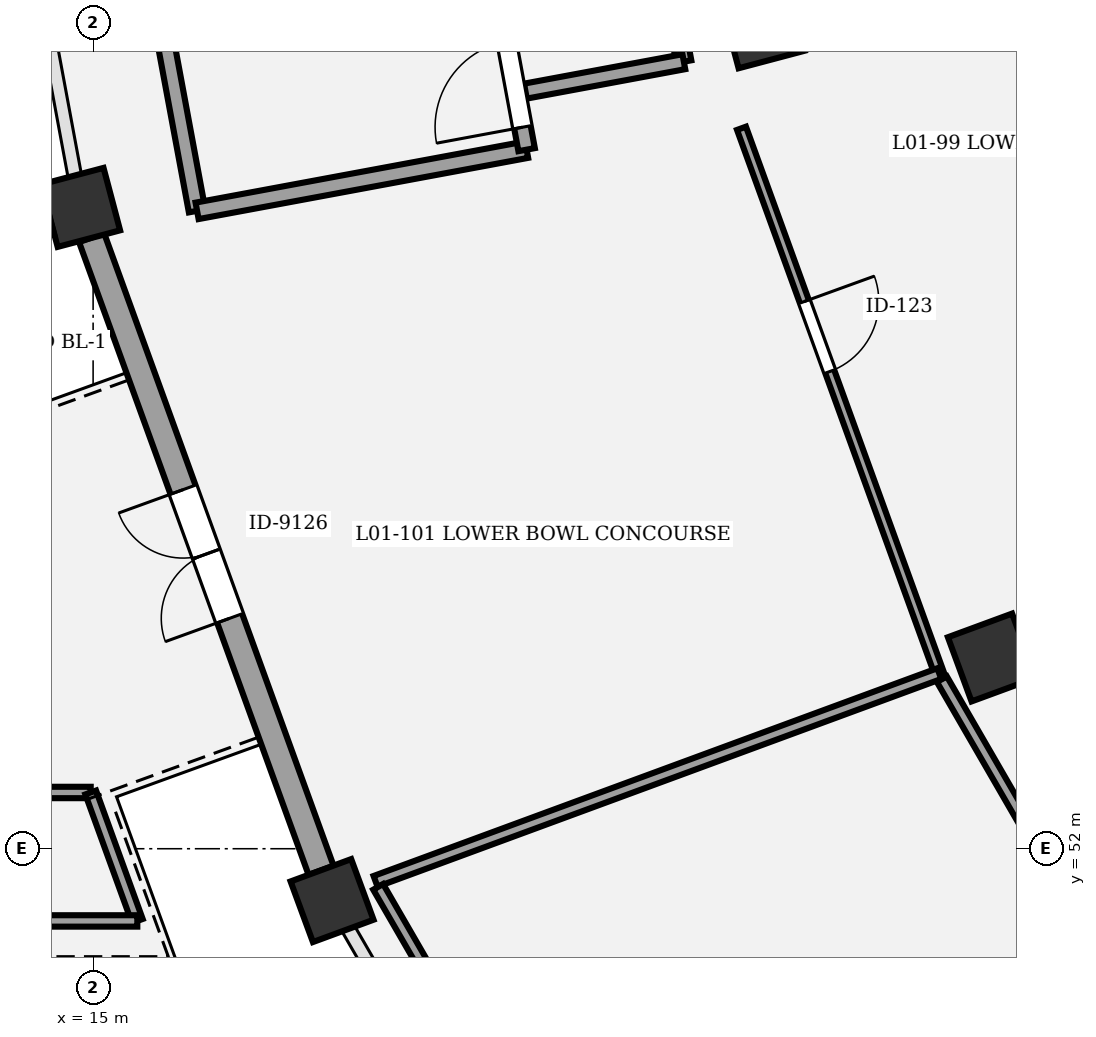
"""IFC4 building model, lengths in metres.
Left out: names, types, materials, properties, quantities, classifications, styles, units other than length and angle.
Written with IfcOpenShell. Run it as: python <this file> out.ifc"""

import sys

from ifc_helpers import new_model, si_unit, direction, frame, frame_2d, origin, origin_2d, place, context, subcontext, project, spatial, rectangle, extrude, element, fill, save


model = new_model("IFC4")
c1 = context("Model", 3, precision=1e-05, world=origin(), true_north=direction((0.0, 1.0)))
c2 = subcontext(c1, "Body", "Model", "MODEL_VIEW")
j1 = project(units=[si_unit("LENGTHUNIT", "METRE"), si_unit("PLANEANGLEUNIT", "RADIAN")], contexts=[c1])
p1 = place(None, origin())
s1 = spatial("IfcSite", under=j1, at=p1, CompositionType="ELEMENT")
p2 = place(p1, origin())
s2 = spatial("IfcBuilding", under=s1, at=p2, CompositionType="ELEMENT")
p3 = place(p2, frame((0.0, 0.0, 5.4)))
s3 = spatial("IfcBuildingStorey", under=s2, at=p3, CompositionType="ELEMENT", Elevation=5.4)
p4 = place(p3, frame((23.812, 62.818, 0.0), z_axis=(0.0, 0.0, 1.0), x_axis=(-0.966600102017, -0.256289373133, 0.0)))
e1 = element("IfcColumn", 1, at=p4, inside=s3, PredefinedType="COLUMN", context=c2, shape_type="SweptSolid", body=[
    extrude(rectangle(XDim=0.9, YDim=0.9, at=origin_2d()), origin(), (0.0, 0.0, 1.0), 4.8),
])
p5 = place(p3, frame((14.835, 60.438, 0.0), z_axis=(0.0, 0.0, 1.0), x_axis=(-0.966600102017, -0.256289373133, 0.0)))
e2 = element("IfcColumn", 2, at=p5, inside=s3, PredefinedType="COLUMN", context=c2, shape_type="SweptSolid", body=[
    extrude(rectangle(XDim=0.85, YDim=0.85, at=origin_2d()), origin(), (0.0, 0.0, 1.0), 4.8),
])
p6 = place(p3, frame((14.252, 60.283, 0.0), z_axis=(0.0, 0.0, 1.0), x_axis=(0.256289373133, -0.966600102017, 0.0)))
e3 = element("IfcColumn", 3, at=p6, inside=s3, PredefinedType="PILASTER", context=c2, shape_type="SweptSolid", body=[
    extrude(rectangle(XDim=0.5, YDim=0.35, at=origin_2d()), origin(), (0.0, 0.0, 1.0), 4.8),
])
p7 = place(p3, frame((26.824, 54.516, 0.0), z_axis=(0.0, 0.0, 1.0), x_axis=(-0.938372433776, -0.34562577382, 0.0)))
e4 = element("IfcColumn", 4, at=p7, inside=s3, PredefinedType="COLUMN", context=c2, shape_type="SweptSolid", body=[
    extrude(rectangle(XDim=0.9, YDim=0.9, at=origin_2d()), origin(), (0.0, 0.0, 1.0), 4.8),
])
p8 = place(p3, frame((18.144, 51.318, 0.0), z_axis=(0.0, 0.0, 1.0), x_axis=(-0.938372433776, -0.34562577382, 0.0)))
e5 = element("IfcColumn", 5, at=p8, inside=s3, PredefinedType="COLUMN", context=c2, shape_type="SweptSolid", body=[
    extrude(rectangle(XDim=0.85, YDim=0.85, at=origin_2d()), origin(), (0.0, 0.0, 1.0), 4.8),
])
p9 = place(p3, frame((18.0, 51.715, 0.0), z_axis=(0.0, 0.0, 1.0), x_axis=(-0.341014666885, 0.940057975324, 0.0)))
e6 = element("IfcWall", 6, at=p9, inside=s3, PredefinedType="STANDARD", context=c2, shape_type="SweptSolid", body=[
    extrude(rectangle(XDim=8.855, YDim=0.35, at=frame_2d((4.428, 0.0))), origin(), (0.0, 0.0, 1.0), 3.57),
])
p10 = place(p9, frame((3.528, 0.0, 0.0)))
e7 = element("IfcOpeningElement", 7, at=p10, cuts=e6, PredefinedType="OPENING", context=c2, shape_type="SweptSolid", body=[
    extrude(rectangle(XDim=1.8, YDim=2.4, at=frame_2d((0.9, 1.2))), frame((0.0, 0.185, 0.0), z_axis=(0.0, -1.0, 0.0), x_axis=(1.0, 0.0, 0.0)), (0.0, 0.0, 1.0), 0.37),
])
p11 = place(p3, frame((16.368, 60.392, 0.0), z_axis=(0.0, 0.0, 1.0), x_axis=(-0.182570778451, 0.983192712979, 0.0)))
e8 = element("IfcWall", 8, at=p11, inside=s3, PredefinedType="SHEAR", context=c2, shape_type="SweptSolid", body=[
    extrude(rectangle(XDim=11.02, YDim=0.22, at=frame_2d((5.51, 0.0))), origin(), (0.0, 0.0, 1.0), 4.55),
])
p12 = place(p3, frame((20.704, 61.197, 0.0), z_axis=(0.0, 0.0, 1.0), x_axis=(-0.983191575486, -0.182576904051, 0.0)))
e9 = element("IfcWall", 9, at=p12, inside=s3, PredefinedType="SHEAR", context=c2, shape_type="SweptSolid", body=[
    extrude(rectangle(XDim=4.41, YDim=0.22, at=frame_2d((2.205, 0.0))), origin(), (0.0, 0.0, 1.0), 4.55),
])
p13 = place(p3, frame((20.704, 61.197, 0.0), z_axis=(0.0, 0.0, 1.0), x_axis=(-0.182570778451, 0.983192712979, 0.0)))
e10 = element("IfcWall", 10, at=p13, inside=s3, PredefinedType="SHEAR", context=c2, shape_type="SweptSolid", body=[
    extrude(rectangle(XDim=11.02, YDim=0.22, at=frame_2d((5.51, 0.0))), origin(), (0.0, 0.0, 1.0), 4.55),
])
p14 = place(p13, frame((0.3, 0.0, 0.0)))
e11 = element("IfcOpeningElement", 11, at=p14, cuts=e10, PredefinedType="OPENING", context=c2, shape_type="SweptSolid", body=[
    extrude(rectangle(XDim=1.15, YDim=2.15, at=frame_2d((0.575, 1.075))), frame((0.0, 0.12, 0.0), z_axis=(0.0, -1.0, 0.0), x_axis=(1.0, 0.0, 0.0)), (0.0, 0.0, 1.0), 0.24),
])
p15 = place(p13, frame((9.23, 0.0, 0.0)))
e12 = element("IfcOpeningElement", 12, at=p15, cuts=e10, PredefinedType="OPENING", context=c2, shape_type="SweptSolid", body=[
    extrude(rectangle(XDim=1.1, YDim=2.15, at=frame_2d((0.55, 1.075))), frame((0.0, 0.12, 0.0), z_axis=(0.0, -1.0, 0.0), x_axis=(1.0, 0.0, 0.0)), (0.0, 0.0, 1.0), 0.24),
])
p16 = place(p3, frame((22.772, 62.354, 0.0), z_axis=(0.0, 0.0, 1.0), x_axis=(-0.182593081072, 0.983188571305, 0.0)))
e13 = element("IfcWall", 13, at=p16, inside=s3, PredefinedType="PARTITIONING", context=c2, shape_type="SweptSolid", body=[
    extrude(rectangle(XDim=3.8, YDim=0.2, at=frame_2d((1.9, 0.0))), origin(), (0.0, 0.0, 1.0), 3.65),
])
p17 = place(p16, frame((1.3, 0.0, 0.0)))
e14 = element("IfcOpeningElement", 14, at=p17, cuts=e13, PredefinedType="OPENING", context=c2, shape_type="SweptSolid", body=[
    extrude(rectangle(XDim=1.2, YDim=2.18, at=frame_2d((0.6, 1.09))), frame((0.0, 0.11, 0.0), z_axis=(0.0, -1.0, 0.0), x_axis=(1.0, 0.0, 0.0)), (0.0, 0.0, 1.0), 0.22),
])
p18 = place(p3, frame((22.772, 62.354, 0.0), z_axis=(0.0, 0.0, 1.0), x_axis=(-0.983181056789, -0.18263353901, 0.0)))
e15 = element("IfcWall", 15, at=p18, inside=s3, PredefinedType="PARTITIONING", context=c2, shape_type="SweptSolid", body=[
    extrude(rectangle(XDim=2.12, YDim=0.2, at=frame_2d((1.06, 0.0))), origin(), (0.0, 0.0, 1.0), 3.65),
])
p19 = place(p3, frame((23.531, 61.478, 0.0), z_axis=(0.0, 0.0, 1.0), x_axis=(0.341013494536, -0.940058400603, 0.0)))
e16 = element("IfcWall", 16, at=p19, inside=s3, PredefinedType="PARTITIONING", context=c2, shape_type="SweptSolid", body=[
    extrude(rectangle(XDim=7.632, YDim=0.125, at=frame_2d((3.816, 0.0))), origin(), (0.0, 0.0, 1.0), 3.55),
])
p20 = place(p19, frame((2.424, 0.0, 0.0)))
e17 = element("IfcOpeningElement", 17, at=p20, cuts=e16, PredefinedType="OPENING", context=c2, shape_type="SweptSolid", body=[
    extrude(rectangle(XDim=0.98, YDim=2.2, at=frame_2d((0.49, 1.1))), frame((0.0, 0.073, 0.0), z_axis=(0.0, -1.0, 0.0), x_axis=(1.0, 0.0, 0.0)), (0.0, 0.0, 1.0), 0.145),
])
p21 = place(p3, frame((26.167, 54.231, 0.0), z_axis=(0.0, 0.0, 1.0), x_axis=(0.500559280672, -0.865702262059, 0.0)))
e18 = element("IfcWall", 18, at=p21, inside=s3, PredefinedType="PARTITIONING", context=c2, shape_type="SweptSolid", body=[
    extrude(rectangle(XDim=8.375, YDim=0.15, at=frame_2d((4.187, 0.0))), origin(), (0.0, 0.0, 1.0), 3.55),
])
p22 = place(p21, frame((3.657, 0.0, 0.0)))
e19 = element("IfcOpeningElement", 19, at=p22, cuts=e18, PredefinedType="OPENING", context=c2, shape_type="SweptSolid", body=[
    extrude(rectangle(XDim=1.06, YDim=2.2, at=frame_2d((0.53, 1.1))), frame((0.0, 0.085, 0.0), z_axis=(0.0, -1.0, 0.0), x_axis=(1.0, 0.0, 0.0)), (0.0, 0.0, 1.0), 0.17),
])
p23 = place(p3, frame((4.36, 52.74, 0.0), z_axis=(0.0, 0.0, 1.0), x_axis=(1.0, 0.0, 0.0)))
e20 = element("IfcWall", 20, at=p23, inside=s3, PredefinedType="PARTITIONING", context=c2, shape_type="SweptSolid", body=[
    extrude(rectangle(XDim=10.608, YDim=0.15, at=frame_2d((5.304, 0.0))), origin(), (0.0, 0.0, 1.0), 3.55),
])
p24 = place(p23, frame((7.479, 0.0, 0.0)))
e21 = element("IfcOpeningElement", 21, at=p24, cuts=e20, PredefinedType="OPENING", context=c2, shape_type="SweptSolid", body=[
    extrude(rectangle(XDim=1.02, YDim=2.1, at=frame_2d((0.51, 1.05))), frame((0.0, 0.085, 0.0), z_axis=(0.0, -1.0, 0.0), x_axis=(1.0, 0.0, 0.0)), (0.0, 0.0, 1.0), 0.17),
])
p25 = place(p3, frame((26.134, 54.304, 0.0), z_axis=(0.0, 0.0, 1.0), x_axis=(-0.938346807893, -0.345695340028, 0.0)))
e22 = element("IfcWall", 22, at=p25, inside=s3, PredefinedType="PARTITIONING", context=c2, shape_type="SweptSolid", body=[
    extrude(rectangle(XDim=7.905, YDim=0.15, at=frame_2d((3.952, 0.0))), origin(), (0.0, 0.0, 1.0), 3.55),
])
p26 = place(p3, frame((23.296, 43.638, 0.0), z_axis=(0.0, 0.0, 1.0), x_axis=(-0.500574107164, 0.865693689036, 0.0)))
e23 = element("IfcWall", 23, at=p26, inside=s3, PredefinedType="PARTITIONING", context=c2, shape_type="SweptSolid", body=[
    extrude(rectangle(XDim=9.08, YDim=0.15, at=frame_2d((4.54, 0.0))), origin(), (0.0, 0.0, 1.0), 3.55),
])
p27 = place(p3, frame((14.969, 52.74, 0.0), z_axis=(0.0, 0.0, 1.0), x_axis=(0.341012375502, -0.940058806541, 0.0)))
e24 = element("IfcWall", 24, at=p27, inside=s3, PredefinedType="PARTITIONING", context=c2, shape_type="SweptSolid", body=[
    extrude(rectangle(XDim=1.798, YDim=0.15, at=frame_2d((0.899, 0.0))), origin(), (0.0, 0.0, 1.0), 3.55),
])
p28 = place(p3, frame((15.582, 51.05, 0.0), z_axis=(0.0, 0.0, 1.0), x_axis=(-1.0, 0.0, 0.0)))
e25 = element("IfcWall", 25, at=p28, inside=s3, PredefinedType="PARTITIONING", context=c2, shape_type="SweptSolid", body=[
    extrude(rectangle(XDim=11.221, YDim=0.15, at=frame_2d((5.611, 0.0))), origin(), (0.0, 0.0, 1.0), 3.55),
])
p29 = place(p10, origin())
e26 = element("IfcDoor", 26, at=p29, inside=s3, OperationType="DOUBLE_DOOR_SINGLE_SWING", PredefinedType="DOOR", context=c2, shape_type="SweptSolid", body=[
    extrude(rectangle(XDim=1.8, YDim=2.4, at=frame_2d((0.9, 1.2))), frame((0.0, 0.025, 0.0), z_axis=(0.0, -1.0, 0.0), x_axis=(1.0, 0.0, 0.0)), (0.0, 0.0, 1.0), 0.05),
])
fill(e7, e26)
p30 = place(p14, origin())
e27 = element("IfcDoor", 27, at=p30, inside=s3, OperationType="SINGLE_SWING_LEFT", PredefinedType="DOOR", context=c2, shape_type="SweptSolid", body=[
    extrude(rectangle(XDim=1.15, YDim=2.15, at=frame_2d((0.575, 1.075))), frame((0.0, 0.025, 0.0), z_axis=(0.0, -1.0, 0.0), x_axis=(1.0, 0.0, 0.0)), (0.0, 0.0, 1.0), 0.05),
])
fill(e11, e27)
p31 = place(p20, origin())
e28 = element("IfcDoor", 28, at=p31, inside=s3, OperationType="SINGLE_SWING_LEFT", PredefinedType="DOOR", context=c2, shape_type="SweptSolid", body=[
    extrude(rectangle(XDim=0.98, YDim=2.2, at=frame_2d((0.49, 1.1))), frame((0.0, 0.025, 0.0), z_axis=(0.0, -1.0, 0.0), x_axis=(1.0, 0.0, 0.0)), (0.0, 0.0, 1.0), 0.05),
])
fill(e17, e28)
save(model, sys.argv[1])
